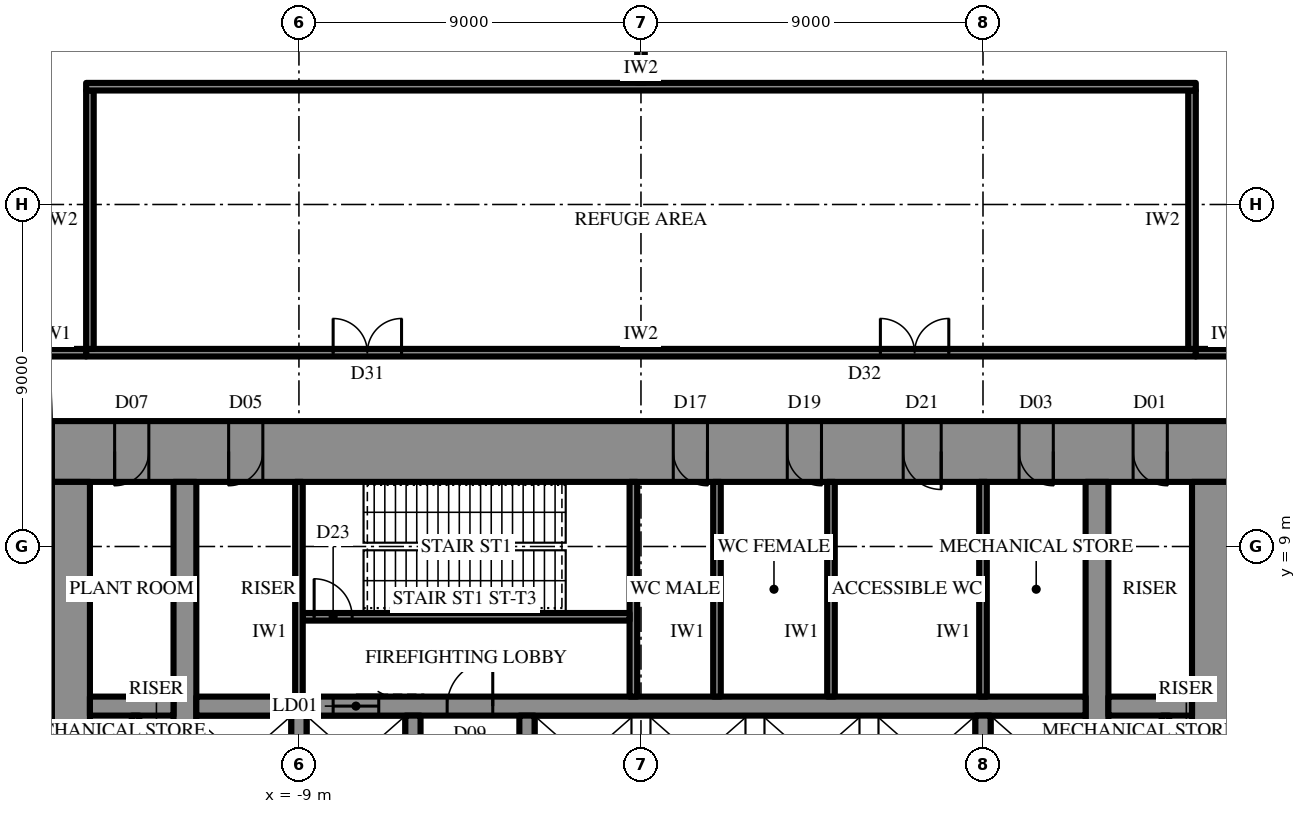
"""IFC4 building model, lengths in metres.
Left out: names, types, materials, properties, quantities, classifications, styles, units other than length and angle.
Written with IfcOpenShell. Run it as: python <this file> out.ifc"""

import sys

from ifc_helpers import new_model, si_unit, direction, frame, frame_2d, origin, place, context, subcontext, project, spatial, rectangle, extrude, element, fill, save


model = new_model("IFC4")
c1 = context("Model", 3, precision=1e-05, world=origin(), true_north=direction((0.0, 1.0)))
c2 = subcontext(c1, "Body", "Model", "MODEL_VIEW")
j1 = project(units=[si_unit("LENGTHUNIT", "METRE"), si_unit("PLANEANGLEUNIT", "RADIAN")], contexts=[c1])
p1 = place(None, origin())
s1 = spatial("IfcSite", under=j1, at=p1, CompositionType="ELEMENT")
p2 = place(p1, origin())
s2 = spatial("IfcBuilding", under=s1, at=p2, CompositionType="ELEMENT")
p3 = place(p2, frame((0.0, 0.0, 299.5)))
s3 = spatial("IfcBuildingStorey", under=s2, at=p3, CompositionType="ELEMENT", Elevation=299.5)
p4 = place(p3, frame((-15.5, 11.5, 0.0), z_axis=(0.0, 0.0, 1.0), x_axis=(1.0, 0.0, 0.0)))
e1 = element("IfcWall", 1, at=p4, inside=s3, PredefinedType="SHEAR", context=c2, shape_type="SweptSolid", body=[
    extrude(rectangle(XDim=31.0, YDim=1.6, at=frame_2d((15.5, 0.0))), origin(), (0.0, 0.0, 1.0), 7.0),
])
p5 = place(p4, frame((16.35, 0.0, 0.0)))
e2 = element("IfcOpeningElement", 2, at=p5, cuts=e1, PredefinedType="OPENING", context=c2, shape_type="SweptSolid", body=[
    extrude(rectangle(XDim=0.9, YDim=2.2, at=frame_2d((0.45, 1.1))), frame((0.0, 0.81, 0.0), z_axis=(0.0, -1.0, 0.0), x_axis=(1.0, 0.0, 0.0)), (0.0, 0.0, 1.0), 1.62),
])
p6 = place(p4, frame((19.35, 0.0, 0.0)))
e3 = element("IfcOpeningElement", 3, at=p6, cuts=e1, PredefinedType="OPENING", context=c2, shape_type="SweptSolid", body=[
    extrude(rectangle(XDim=0.9, YDim=2.2, at=frame_2d((0.45, 1.1))), frame((0.0, 0.81, 0.0), z_axis=(0.0, -1.0, 0.0), x_axis=(1.0, 0.0, 0.0)), (0.0, 0.0, 1.0), 1.62),
])
p7 = place(p4, frame((22.4, 0.0, 0.0)))
e4 = element("IfcOpeningElement", 4, at=p7, cuts=e1, PredefinedType="OPENING", context=c2, shape_type="SweptSolid", body=[
    extrude(rectangle(XDim=1.0, YDim=2.2, at=frame_2d((0.5, 1.1))), frame((0.0, 0.81, 0.0), z_axis=(0.0, -1.0, 0.0), x_axis=(1.0, 0.0, 0.0)), (0.0, 0.0, 1.0), 1.62),
])
p8 = place(p4, frame((1.65, 0.0, 0.0)))
e5 = element("IfcOpeningElement", 5, at=p8, cuts=e1, PredefinedType="OPENING", context=c2, shape_type="SweptSolid", body=[
    extrude(rectangle(XDim=0.9, YDim=2.2, at=frame_2d((0.45, 1.1))), frame((0.0, 0.81, 0.0), z_axis=(0.0, -1.0, 0.0), x_axis=(1.0, 0.0, 0.0)), (0.0, 0.0, 1.0), 1.62),
])
p9 = place(p4, frame((4.65, 0.0, 0.0)))
e6 = element("IfcOpeningElement", 6, at=p9, cuts=e1, PredefinedType="OPENING", context=c2, shape_type="SweptSolid", body=[
    extrude(rectangle(XDim=0.9, YDim=2.2, at=frame_2d((0.45, 1.1))), frame((0.0, 0.81, 0.0), z_axis=(0.0, -1.0, 0.0), x_axis=(1.0, 0.0, 0.0)), (0.0, 0.0, 1.0), 1.62),
])
p10 = place(p4, frame((25.45, 0.0, 0.0)))
e7 = element("IfcOpeningElement", 7, at=p10, cuts=e1, PredefinedType="OPENING", context=c2, shape_type="SweptSolid", body=[
    extrude(rectangle(XDim=0.9, YDim=2.2, at=frame_2d((0.45, 1.1))), frame((0.0, 0.81, 0.0), z_axis=(0.0, -1.0, 0.0), x_axis=(1.0, 0.0, 0.0)), (0.0, 0.0, 1.0), 1.62),
])
p11 = place(p4, frame((28.45, 0.0, 0.0)))
e8 = element("IfcOpeningElement", 8, at=p11, cuts=e1, PredefinedType="OPENING", context=c2, shape_type="SweptSolid", body=[
    extrude(rectangle(XDim=0.9, YDim=2.2, at=frame_2d((0.45, 1.1))), frame((0.0, 0.81, 0.0), z_axis=(0.0, -1.0, 0.0), x_axis=(1.0, 0.0, 0.0)), (0.0, 0.0, 1.0), 1.62),
])
p12 = place(p3, frame((15.0, -10.7, 0.0), z_axis=(0.0, 0.0, 1.0), x_axis=(0.0, 1.0, 0.0)))
e9 = element("IfcWall", 9, at=p12, inside=s3, PredefinedType="SHEAR", context=c2, shape_type="SweptSolid", body=[
    extrude(rectangle(XDim=21.4, YDim=1.0, at=frame_2d((10.7, 0.0))), origin(), (0.0, 0.0, 1.0), 7.0),
])
p13 = place(p12, frame((9.8, 0.0, 0.0)))
e10 = element("IfcOpeningElement", 10, at=p13, cuts=e9, PredefinedType="OPENING", context=c2, shape_type="SweptSolid", body=[
    extrude(rectangle(XDim=1.8, YDim=2.4, at=frame_2d((0.9, 1.2))), frame((0.0, 0.51, 0.0), z_axis=(0.0, -1.0, 0.0), x_axis=(1.0, 0.0, 0.0)), (0.0, 0.0, 1.0), 1.02),
])
p14 = place(p3, frame((-15.0, 10.7, 0.0), z_axis=(0.0, 0.0, 1.0), x_axis=(0.0, -1.0, 0.0)))
e11 = element("IfcWall", 11, at=p14, inside=s3, PredefinedType="SHEAR", context=c2, shape_type="SweptSolid", body=[
    extrude(rectangle(XDim=21.4, YDim=1.0, at=frame_2d((10.7, 0.0))), origin(), (0.0, 0.0, 1.0), 7.0),
])
p15 = place(p14, frame((9.8, 0.0, 0.0)))
e12 = element("IfcOpeningElement", 12, at=p15, cuts=e11, PredefinedType="OPENING", context=c2, shape_type="SweptSolid", body=[
    extrude(rectangle(XDim=1.8, YDim=2.4, at=frame_2d((0.9, 1.2))), frame((0.0, 0.51, 0.0), z_axis=(0.0, -1.0, 0.0), x_axis=(1.0, 0.0, 0.0)), (0.0, 0.0, 1.0), 1.02),
])
p16 = place(p3, frame((12.0, -10.7, 0.0), z_axis=(0.0, 0.0, 1.0), x_axis=(0.0, 1.0, 0.0)))
e13 = element("IfcWall", 13, at=p16, inside=s3, PredefinedType="SHEAR", context=c2, shape_type="SweptSolid", body=[
    extrude(rectangle(XDim=21.4, YDim=0.6, at=frame_2d((10.7, 0.0))), origin(), (0.0, 0.0, 1.0), 7.0),
])
p17 = place(p16, frame((9.8, 0.0, 0.0)))
e14 = element("IfcOpeningElement", 14, at=p17, cuts=e13, PredefinedType="OPENING", context=c2, shape_type="SweptSolid", body=[
    extrude(rectangle(XDim=1.8, YDim=2.4, at=frame_2d((0.9, 1.2))), frame((0.0, 0.31, 0.0), z_axis=(0.0, -1.0, 0.0), x_axis=(1.0, 0.0, 0.0)), (0.0, 0.0, 1.0), 0.62),
])
p18 = place(p3, frame((-12.0, -10.7, 0.0), z_axis=(0.0, 0.0, 1.0), x_axis=(0.0, 1.0, 0.0)))
e15 = element("IfcWall", 15, at=p18, inside=s3, PredefinedType="SHEAR", context=c2, shape_type="SweptSolid", body=[
    extrude(rectangle(XDim=21.4, YDim=0.6, at=frame_2d((10.7, 0.0))), origin(), (0.0, 0.0, 1.0), 7.0),
])
p19 = place(p18, frame((9.8, 0.0, 0.0)))
e16 = element("IfcOpeningElement", 16, at=p19, cuts=e15, PredefinedType="OPENING", context=c2, shape_type="SweptSolid", body=[
    extrude(rectangle(XDim=1.8, YDim=2.4, at=frame_2d((0.9, 1.2))), frame((0.0, 0.31, 0.0), z_axis=(0.0, -1.0, 0.0), x_axis=(1.0, 0.0, 0.0)), (0.0, 0.0, 1.0), 0.62),
])
p20 = place(p3, frame((-14.5, 4.8, 0.0), z_axis=(0.0, 0.0, 1.0), x_axis=(1.0, 0.0, 0.0)))
e17 = element("IfcWall", 17, at=p20, inside=s3, PredefinedType="SHEAR", context=c2, shape_type="SweptSolid", body=[
    extrude(rectangle(XDim=2.2, YDim=0.5, at=frame_2d((1.1, 0.0))), origin(), (0.0, 0.0, 1.0), 7.0),
])
p21 = place(p3, frame((-11.7, 4.8, 0.0), z_axis=(0.0, 0.0, 1.0), x_axis=(1.0, 0.0, 0.0)))
e18 = element("IfcWall", 18, at=p21, inside=s3, PredefinedType="SHEAR", context=c2, shape_type="SweptSolid", body=[
    extrude(rectangle(XDim=23.4, YDim=0.5, at=frame_2d((11.7, 0.0))), origin(), (0.0, 0.0, 1.0), 7.0),
])
p22 = place(p21, frame((6.6, 0.0, 0.0)))
e19 = element("IfcOpeningElement", 19, at=p22, cuts=e18, PredefinedType="OPENING", context=c2, shape_type="SweptSolid", body=[
    extrude(rectangle(XDim=1.2, YDim=2.2, at=frame_2d((0.6, 1.1))), frame((0.0, 0.26, 0.0), z_axis=(0.0, -1.0, 0.0), x_axis=(1.0, 0.0, 0.0)), (0.0, 0.0, 1.0), 0.52),
])
p23 = place(p21, frame((3.6, 0.0, 0.0)))
e20 = element("IfcOpeningElement", 20, at=p23, cuts=e18, PredefinedType="OPENING", context=c2, shape_type="SweptSolid", body=[
    extrude(rectangle(XDim=1.2, YDim=2.2, at=frame_2d((0.6, 1.1))), frame((0.0, 0.26, 0.0), z_axis=(0.0, -1.0, 0.0), x_axis=(1.0, 0.0, 0.0)), (0.0, 0.0, 1.0), 0.52),
])
p24 = place(p3, frame((12.3, 4.8, 0.0), z_axis=(0.0, 0.0, 1.0), x_axis=(1.0, 0.0, 0.0)))
e21 = element("IfcWall", 21, at=p24, inside=s3, PredefinedType="SHEAR", context=c2, shape_type="SweptSolid", body=[
    extrude(rectangle(XDim=2.2, YDim=0.5, at=frame_2d((1.1, 0.0))), origin(), (0.0, 0.0, 1.0), 7.0),
])
for number, where, z_axis, x_axis in (
    (22, (-9.0, 2.25, 0.0), (0.0, 0.0, 1.0), (0.0, 1.0, 0.0)),
    (23, (-6.0, 2.25, 0.0), (0.0, 0.0, 1.0), (0.0, 1.0, 0.0)),
    (24, (-3.0, 2.25, 0.0), (0.0, 0.0, 1.0), (0.0, 1.0, 0.0)),
    (25, (9.0, 2.25, 0.0), (0.0, 0.0, 1.0), (0.0, 1.0, 0.0)),
):
    element("IfcWall", number, at=place(p3, frame(where, z_axis=z_axis, x_axis=x_axis)), inside=s3, PredefinedType="SHEAR", context=c2, shape_type="SweptSolid", body=[
        extrude(rectangle(XDim=2.3, YDim=0.4, at=frame_2d((1.15, 0.0))), origin(), (0.0, 0.0, 1.0), 7.0),
    ])
p25 = place(p3, frame((-0.2, 5.05, 0.0), z_axis=(0.0, 0.0, 1.0), x_axis=(0.0, 1.0, 0.0)))
e26 = element("IfcWall", 26, at=p25, inside=s3, PredefinedType="SHEAR", context=c2, shape_type="SweptSolid", body=[
    extrude(rectangle(XDim=5.65, YDim=0.2, at=frame_2d((2.825, 0.0))), origin(), (0.0, 0.0, 1.0), 7.0),
])
p26 = place(p3, frame((-8.9, 7.15, 0.0), z_axis=(0.0, 0.0, 1.0), x_axis=(1.0, 0.0, 0.0)))
e27 = element("IfcWall", 27, at=p26, inside=s3, PredefinedType="SHEAR", context=c2, shape_type="SweptSolid", body=[
    extrude(rectangle(XDim=8.6, YDim=0.2, at=frame_2d((4.3, 0.0))), origin(), (0.0, 0.0, 1.0), 7.0),
])
p27 = place(p26, frame((0.3, 0.0, 0.0)))
e28 = element("IfcOpeningElement", 28, at=p27, cuts=e27, PredefinedType="OPENING", context=c2, shape_type="SweptSolid", body=[
    extrude(rectangle(XDim=1.0, YDim=2.2, at=frame_2d((0.5, 1.1))), frame((0.0, 0.11, 0.0), z_axis=(0.0, -1.0, 0.0), x_axis=(1.0, 0.0, 0.0)), (0.0, 0.0, 1.0), 0.22),
])
for number, where, z_axis, x_axis in (
    (29, (-9.0, 5.05, 0.0), (0.0, 0.0, 1.0), (0.0, 1.0, 0.0)),
    (30, (9.0, 5.05, 0.0), (0.0, 0.0, 1.0), (0.0, 1.0, 0.0)),
    (31, (2.0, 5.05, 0.0), (0.0, 0.0, 1.0), (0.0, 1.0, 0.0)),
    (32, (5.0, 5.05, 0.0), (0.0, 0.0, 1.0), (0.0, 1.0, 0.0)),
):
    element("IfcWall", number, at=place(p3, frame(where, z_axis=z_axis, x_axis=x_axis)), inside=s3, PredefinedType="PARTITIONING", context=c2, shape_type="SweptSolid", body=[
        extrude(rectangle(XDim=5.65, YDim=0.2, at=frame_2d((2.825, 0.0))), origin(), (0.0, 0.0, 1.0), 6.7),
    ])
for number, where, z_axis, x_axis in (
    (33, (-13.3, 3.55, 0.0), (0.0, 0.0, 1.0), (0.0, 1.0, 0.0)),
    (34, (13.8, 3.55, 0.0), (0.0, 0.0, 1.0), (0.0, 1.0, 0.0)),
):
    element("IfcWall", number, at=place(p3, frame(where, z_axis=z_axis, x_axis=x_axis)), inside=s3, PredefinedType="PARTITIONING", context=c2, shape_type="SweptSolid", body=[
        extrude(rectangle(XDim=1.0, YDim=0.2, at=frame_2d((0.5, 0.0))), origin(), (0.0, 0.0, 1.0), 6.7),
    ])
p28 = place(p3, frame((-14.6, 14.1, 0.0), z_axis=(0.0, 0.0, 1.0), x_axis=(1.0, 0.0, 0.0)))
e35 = element("IfcWall", 35, at=p28, inside=s3, PredefinedType="PARTITIONING", context=c2, shape_type="SweptSolid", body=[
    extrude(rectangle(XDim=29.2, YDim=0.2, at=frame_2d((14.6, 0.0))), origin(), (0.0, 0.0, 1.0), 6.7),
])
p29 = place(p28, frame((6.5, 0.0, 0.0)))
e36 = element("IfcOpeningElement", 36, at=p29, cuts=e35, PredefinedType="OPENING", context=c2, shape_type="SweptSolid", body=[
    extrude(rectangle(XDim=1.8, YDim=2.4, at=frame_2d((0.9, 1.2))), frame((0.0, 0.11, 0.0), z_axis=(0.0, -1.0, 0.0), x_axis=(1.0, 0.0, 0.0)), (0.0, 0.0, 1.0), 0.22),
])
p30 = place(p28, frame((20.9, 0.0, 0.0)))
e37 = element("IfcOpeningElement", 37, at=p30, cuts=e35, PredefinedType="OPENING", context=c2, shape_type="SweptSolid", body=[
    extrude(rectangle(XDim=1.8, YDim=2.4, at=frame_2d((0.9, 1.2))), frame((0.0, 0.11, 0.0), z_axis=(0.0, -1.0, 0.0), x_axis=(1.0, 0.0, 0.0)), (0.0, 0.0, 1.0), 0.22),
])
for number, where, z_axis, x_axis in (
    (38, (-14.5, 14.2, 0.0), (0.0, 0.0, 1.0), (0.0, 1.0, 0.0)),
    (39, (14.5, 14.2, 0.0), (0.0, 0.0, 1.0), (0.0, 1.0, 0.0)),
):
    element("IfcWall", number, at=place(p3, frame(where, z_axis=z_axis, x_axis=x_axis)), inside=s3, PredefinedType="PARTITIONING", context=c2, shape_type="SweptSolid", body=[
        extrude(rectangle(XDim=6.8, YDim=0.2, at=frame_2d((3.4, 0.0))), origin(), (0.0, 0.0, 1.0), 6.7),
    ])
p31 = place(p3, frame((-14.6, 21.1, 0.0), z_axis=(0.0, 0.0, 1.0), x_axis=(1.0, 0.0, 0.0)))
e40 = element("IfcWall", 40, at=p31, inside=s3, PredefinedType="PARTITIONING", context=c2, shape_type="SweptSolid", body=[
    extrude(rectangle(XDim=29.2, YDim=0.2, at=frame_2d((14.6, 0.0))), origin(), (0.0, 0.0, 1.0), 6.7),
])
for number, where, z_axis, x_axis in (
    (41, (-16.3, 14.1, 0.0), (0.0, 0.0, 1.0), (1.0, 0.0, 0.0)),
    (42, (14.6, 14.1, 0.0), (0.0, 0.0, 1.0), (1.0, 0.0, 0.0)),
):
    element("IfcWall", number, at=place(p3, frame(where, z_axis=z_axis, x_axis=x_axis)), inside=s3, PredefinedType="PARTITIONING", context=c2, shape_type="SweptSolid", body=[
        extrude(rectangle(XDim=1.7, YDim=0.2, at=frame_2d((0.85, 0.0))), origin(), (0.0, 0.0, 1.0), 6.7),
    ])
p32 = place(p3, frame((0.0, 21.2, 0.0), z_axis=(0.0, 0.0, 1.0), x_axis=(0.0, 1.0, 0.0)))
e43 = element("IfcWall", 43, at=p32, inside=s3, PredefinedType="PARTITIONING", context=c2, shape_type="SweptSolid", body=[
    extrude(rectangle(XDim=7.61, YDim=0.2, at=frame_2d((3.805, 0.0))), origin(), (0.0, 0.0, 1.0), 2.7),
])
p33 = place(p22, origin())
e44 = element("IfcDoor", 44, at=p33, inside=s3, OperationType="SINGLE_SWING_LEFT", PredefinedType="DOOR", context=c2, shape_type="SweptSolid", body=[
    extrude(rectangle(XDim=1.2, YDim=2.2, at=frame_2d((0.6, 1.1))), frame((0.0, 0.025, 0.0), z_axis=(0.0, -1.0, 0.0), x_axis=(1.0, 0.0, 0.0)), (0.0, 0.0, 1.0), 0.05),
])
fill(e19, e44)
p34 = place(p27, origin())
e45 = element("IfcDoor", 45, at=p34, inside=s3, OperationType="SINGLE_SWING_RIGHT", PredefinedType="DOOR", context=c2, shape_type="SweptSolid", body=[
    extrude(rectangle(XDim=1.0, YDim=2.2, at=frame_2d((0.5, 1.1))), frame((0.0, 0.025, 0.0), z_axis=(0.0, -1.0, 0.0), x_axis=(1.0, 0.0, 0.0)), (0.0, 0.0, 1.0), 0.05),
])
fill(e28, e45)
p35 = place(p5, frame((0.9, 0.0, 0.0), z_axis=(0.0, 0.0, 1.0), x_axis=(-1.0, 0.0, 0.0)))
e46 = element("IfcDoor", 46, at=p35, inside=s3, OperationType="SINGLE_SWING_RIGHT", PredefinedType="DOOR", context=c2, shape_type="SweptSolid", body=[
    extrude(rectangle(XDim=0.9, YDim=2.2, at=frame_2d((0.45, 1.1))), frame((0.0, 0.025, 0.0), z_axis=(0.0, -1.0, 0.0), x_axis=(1.0, 0.0, 0.0)), (0.0, 0.0, 1.0), 0.05),
])
fill(e2, e46)
p36 = place(p6, frame((0.9, 0.0, 0.0), z_axis=(0.0, 0.0, 1.0), x_axis=(-1.0, 0.0, 0.0)))
e47 = element("IfcDoor", 47, at=p36, inside=s3, OperationType="SINGLE_SWING_RIGHT", PredefinedType="DOOR", context=c2, shape_type="SweptSolid", body=[
    extrude(rectangle(XDim=0.9, YDim=2.2, at=frame_2d((0.45, 1.1))), frame((0.0, 0.025, 0.0), z_axis=(0.0, -1.0, 0.0), x_axis=(1.0, 0.0, 0.0)), (0.0, 0.0, 1.0), 0.05),
])
fill(e3, e47)
p37 = place(p7, frame((1.0, 0.0, 0.0), z_axis=(0.0, 0.0, 1.0), x_axis=(-1.0, 0.0, 0.0)))
e48 = element("IfcDoor", 48, at=p37, inside=s3, OperationType="SINGLE_SWING_RIGHT", PredefinedType="DOOR", context=c2, shape_type="SweptSolid", body=[
    extrude(rectangle(XDim=1.0, YDim=2.2, at=frame_2d((0.5, 1.1))), frame((0.0, 0.025, 0.0), z_axis=(0.0, -1.0, 0.0), x_axis=(1.0, 0.0, 0.0)), (0.0, 0.0, 1.0), 0.05),
])
fill(e4, e48)
p38 = place(p8, frame((0.9, 0.0, 0.0), z_axis=(0.0, 0.0, 1.0), x_axis=(-1.0, 0.0, 0.0)))
e49 = element("IfcDoor", 49, at=p38, inside=s3, OperationType="SINGLE_SWING_LEFT", PredefinedType="DOOR", context=c2, shape_type="SweptSolid", body=[
    extrude(rectangle(XDim=0.9, YDim=2.2, at=frame_2d((0.45, 1.1))), frame((0.0, 0.025, 0.0), z_axis=(0.0, -1.0, 0.0), x_axis=(1.0, 0.0, 0.0)), (0.0, 0.0, 1.0), 0.05),
])
fill(e5, e49)
p39 = place(p9, frame((0.9, 0.0, 0.0), z_axis=(0.0, 0.0, 1.0), x_axis=(-1.0, 0.0, 0.0)))
e50 = element("IfcDoor", 50, at=p39, inside=s3, OperationType="SINGLE_SWING_LEFT", PredefinedType="DOOR", context=c2, shape_type="SweptSolid", body=[
    extrude(rectangle(XDim=0.9, YDim=2.2, at=frame_2d((0.45, 1.1))), frame((0.0, 0.025, 0.0), z_axis=(0.0, -1.0, 0.0), x_axis=(1.0, 0.0, 0.0)), (0.0, 0.0, 1.0), 0.05),
])
fill(e6, e50)
p40 = place(p10, frame((0.9, 0.0, 0.0), z_axis=(0.0, 0.0, 1.0), x_axis=(-1.0, 0.0, 0.0)))
e51 = element("IfcDoor", 51, at=p40, inside=s3, OperationType="SINGLE_SWING_RIGHT", PredefinedType="DOOR", context=c2, shape_type="SweptSolid", body=[
    extrude(rectangle(XDim=0.9, YDim=2.2, at=frame_2d((0.45, 1.1))), frame((0.0, 0.025, 0.0), z_axis=(0.0, -1.0, 0.0), x_axis=(1.0, 0.0, 0.0)), (0.0, 0.0, 1.0), 0.05),
])
fill(e7, e51)
p41 = place(p11, frame((0.9, 0.0, 0.0), z_axis=(0.0, 0.0, 1.0), x_axis=(-1.0, 0.0, 0.0)))
e52 = element("IfcDoor", 52, at=p41, inside=s3, OperationType="SINGLE_SWING_RIGHT", PredefinedType="DOOR", context=c2, shape_type="SweptSolid", body=[
    extrude(rectangle(XDim=0.9, YDim=2.2, at=frame_2d((0.45, 1.1))), frame((0.0, 0.025, 0.0), z_axis=(0.0, -1.0, 0.0), x_axis=(1.0, 0.0, 0.0)), (0.0, 0.0, 1.0), 0.05),
])
fill(e8, e52)
p42 = place(p23, origin())
e53 = element("IfcDoor", 53, at=p42, inside=s3, OperationType="SLIDING_TO_LEFT", PredefinedType="DOOR", context=c2, shape_type="SweptSolid", body=[
    extrude(rectangle(XDim=1.2, YDim=2.2, at=frame_2d((0.6, 1.1))), frame((0.0, 0.025, 0.0), z_axis=(0.0, -1.0, 0.0), x_axis=(1.0, 0.0, 0.0)), (0.0, 0.0, 1.0), 0.05),
])
fill(e20, e53)
p43 = place(p29, origin())
e54 = element("IfcDoor", 54, at=p43, inside=s3, OperationType="DOUBLE_DOOR_SINGLE_SWING", PredefinedType="DOOR", context=c2, shape_type="SweptSolid", body=[
    extrude(rectangle(XDim=1.8, YDim=2.4, at=frame_2d((0.9, 1.2))), frame((0.0, 0.025, 0.0), z_axis=(0.0, -1.0, 0.0), x_axis=(1.0, 0.0, 0.0)), (0.0, 0.0, 1.0), 0.05),
])
fill(e36, e54)
p44 = place(p30, origin())
e55 = element("IfcDoor", 55, at=p44, inside=s3, OperationType="DOUBLE_DOOR_SINGLE_SWING", PredefinedType="DOOR", context=c2, shape_type="SweptSolid", body=[
    extrude(rectangle(XDim=1.8, YDim=2.4, at=frame_2d((0.9, 1.2))), frame((0.0, 0.025, 0.0), z_axis=(0.0, -1.0, 0.0), x_axis=(1.0, 0.0, 0.0)), (0.0, 0.0, 1.0), 0.05),
])
fill(e37, e55)
save(model, sys.argv[1])
